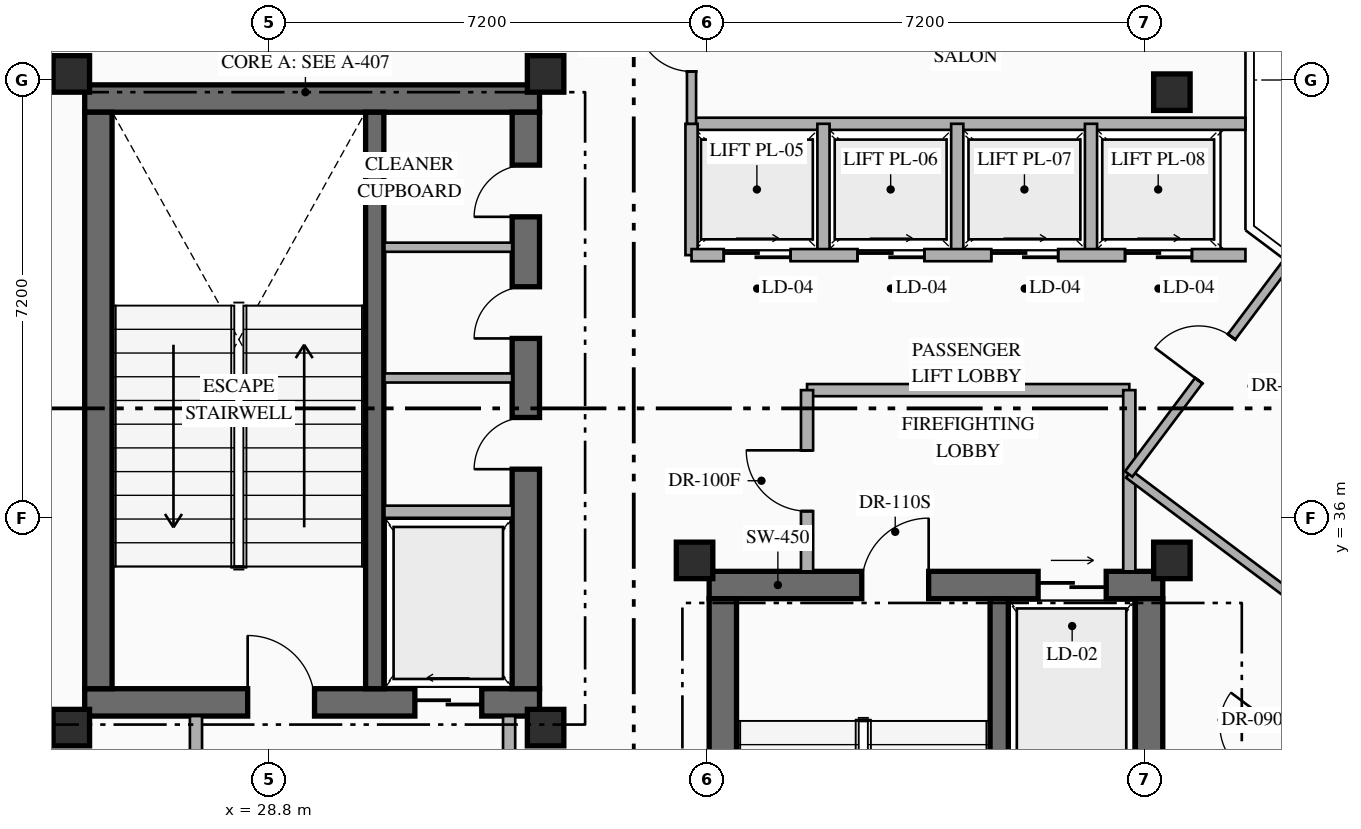
"""IFC4 building model, lengths in metres.
Left out: names, types, materials, properties, quantities, classifications, styles, units other than length and angle.
Written with IfcOpenShell. Run it as: python <this file> out.ifc"""

import sys

from ifc_helpers import new_model, si_unit, direction, frame, frame_2d, origin, origin_2d, place, context, subcontext, project, spatial, rectangle, hollow_rectangle, extrude, element, fill, save


model = new_model("IFC4")
c1 = context("Model", 3, precision=1e-05, world=origin(), true_north=direction((0.0, 1.0)))
c2 = subcontext(c1, "Body", "Model", "MODEL_VIEW")
j1 = project(units=[si_unit("LENGTHUNIT", "METRE"), si_unit("PLANEANGLEUNIT", "RADIAN")], contexts=[c1])
p1 = place(None, origin())
s1 = spatial("IfcSite", under=j1, at=p1, CompositionType="ELEMENT")
p2 = place(p1, origin())
s2 = spatial("IfcBuilding", under=s1, at=p2, CompositionType="ELEMENT")
p3 = place(p2, frame((0.0, 0.0, 273.95)))
s3 = spatial("IfcBuildingStorey", under=s2, at=p3, CompositionType="ELEMENT", Elevation=273.95)
p4 = place(p3, frame((25.77, 32.965, 0.0), z_axis=(0.0, 0.0, 1.0), x_axis=(1.0, 0.0, 0.0)))
e1 = element("IfcWall", 1, at=p4, inside=s3, PredefinedType="SHEAR", context=c2, shape_type="SweptSolid", body=[
    extrude(rectangle(XDim=7.48, YDim=0.45, at=frame_2d((3.74, 0.0))), origin(), (0.0, 0.0, 1.0), 4.0),
])
p5 = place(p4, frame((2.68, 0.0, 0.0)))
e2 = element("IfcOpeningElement", 2, at=p5, cuts=e1, PredefinedType="OPENING", context=c2, shape_type="SweptSolid", body=[
    extrude(rectangle(XDim=1.1, YDim=2.2, at=frame_2d((0.55, 1.1))), frame((0.0, 0.235, 0.0), z_axis=(0.0, -1.0, 0.0), x_axis=(1.0, 0.0, 0.0)), (0.0, 0.0, 1.0), 0.47),
])
p6 = place(p4, frame((5.43, 0.0, 0.0)))
e3 = element("IfcOpeningElement", 3, at=p6, cuts=e1, PredefinedType="OPENING", context=c2, shape_type="SweptSolid", body=[
    extrude(rectangle(XDim=1.1, YDim=2.15, at=frame_2d((0.55, 1.075))), frame((0.0, 0.235, 0.0), z_axis=(0.0, -1.0, 0.0), x_axis=(1.0, 0.0, 0.0)), (0.0, 0.0, 1.0), 0.47),
])
p7 = place(p3, frame((25.77, 42.895, 0.0), z_axis=(0.0, 0.0, 1.0), x_axis=(1.0, 0.0, 0.0)))
e4 = element("IfcWall", 4, at=p7, inside=s3, PredefinedType="SHEAR", context=c2, shape_type="SweptSolid", body=[
    extrude(rectangle(XDim=7.48, YDim=0.45, at=frame_2d((3.74, 0.0))), origin(), (0.0, 0.0, 1.0), 4.0),
])
p8 = place(p3, frame((25.995, 33.19, 0.0), z_axis=(0.0, 0.0, 1.0), x_axis=(0.0, 1.0, 0.0)))
e5 = element("IfcWall", 5, at=p8, inside=s3, PredefinedType="SHEAR", context=c2, shape_type="SweptSolid", body=[
    extrude(rectangle(XDim=9.48, YDim=0.45, at=frame_2d((4.74, 0.0))), origin(), (0.0, 0.0, 1.0), 4.0),
])
p9 = place(p3, frame((33.025, 33.19, 0.0), z_axis=(0.0, 0.0, 1.0), x_axis=(0.0, 1.0, 0.0)))
e6 = element("IfcWall", 6, at=p9, inside=s3, PredefinedType="SHEAR", context=c2, shape_type="SweptSolid", body=[
    extrude(rectangle(XDim=9.48, YDim=0.45, at=frame_2d((4.74, 0.0))), origin(), (0.0, 0.0, 1.0), 4.0),
])
p10 = place(p9, frame((3.61, 0.0, 0.0)))
e7 = element("IfcOpeningElement", 7, at=p10, cuts=e6, PredefinedType="OPENING", context=c2, shape_type="SweptSolid", body=[
    extrude(rectangle(XDim=0.85, YDim=2.08, at=frame_2d((0.425, 1.04))), frame((0.0, 0.235, 0.0), z_axis=(0.0, -1.0, 0.0), x_axis=(1.0, 0.0, 0.0)), (0.0, 0.0, 1.0), 0.47),
])
p11 = place(p9, frame((5.76, 0.0, 0.0)))
e8 = element("IfcOpeningElement", 8, at=p11, cuts=e6, PredefinedType="OPENING", context=c2, shape_type="SweptSolid", body=[
    extrude(rectangle(XDim=0.85, YDim=2.08, at=frame_2d((0.425, 1.04))), frame((0.0, 0.235, 0.0), z_axis=(0.0, -1.0, 0.0), x_axis=(1.0, 0.0, 0.0)), (0.0, 0.0, 1.0), 0.47),
])
p12 = place(p9, frame((7.76, 0.0, 0.0)))
e9 = element("IfcOpeningElement", 9, at=p12, cuts=e6, PredefinedType="OPENING", context=c2, shape_type="SweptSolid", body=[
    extrude(rectangle(XDim=0.85, YDim=2.08, at=frame_2d((0.425, 1.04))), frame((0.0, 0.235, 0.0), z_axis=(0.0, -1.0, 0.0), x_axis=(1.0, 0.0, 0.0)), (0.0, 0.0, 1.0), 0.47),
])
p13 = place(p3, frame((30.54, 33.19, 0.0), z_axis=(0.0, 0.0, 1.0), x_axis=(0.0, 1.0, 0.0)))
e10 = element("IfcWall", 10, at=p13, inside=s3, PredefinedType="SHEAR", context=c2, shape_type="SweptSolid", body=[
    extrude(rectangle(XDim=9.48, YDim=0.3, at=frame_2d((4.74, 0.0))), origin(), (0.0, 0.0, 1.0), 4.0),
])
p14 = place(p3, frame((36.04, 34.895, 0.0), z_axis=(0.0, 0.0, 1.0), x_axis=(1.0, 0.0, 0.0)))
e11 = element("IfcWall", 11, at=p14, inside=s3, PredefinedType="SHEAR", context=c2, shape_type="SweptSolid", body=[
    extrude(rectangle(XDim=7.46, YDim=0.45, at=frame_2d((3.73, 0.0))), origin(), (0.0, 0.0, 1.0), 4.0),
])
p15 = place(p14, frame((2.51, 0.0, 0.0)))
e12 = element("IfcOpeningElement", 12, at=p15, cuts=e11, PredefinedType="OPENING", context=c2, shape_type="SweptSolid", body=[
    extrude(rectangle(XDim=1.1, YDim=2.2, at=frame_2d((0.55, 1.1))), frame((0.0, 0.235, 0.0), z_axis=(0.0, -1.0, 0.0), x_axis=(1.0, 0.0, 0.0)), (0.0, 0.0, 1.0), 0.47),
])
p16 = place(p14, frame((5.41, 0.0, 0.0)))
e13 = element("IfcOpeningElement", 13, at=p16, cuts=e11, PredefinedType="OPENING", context=c2, shape_type="SweptSolid", body=[
    extrude(rectangle(XDim=1.12, YDim=2.15, at=frame_2d((0.56, 1.075))), frame((0.0, 0.235, 0.0), z_axis=(0.0, -1.0, 0.0), x_axis=(1.0, 0.0, 0.0)), (0.0, 0.0, 1.0), 0.47),
])
p17 = place(p3, frame((36.265, 25.19, 0.0), z_axis=(0.0, 0.0, 1.0), x_axis=(0.0, 1.0, 0.0)))
e14 = element("IfcWall", 14, at=p17, inside=s3, PredefinedType="SHEAR", context=c2, shape_type="SweptSolid", body=[
    extrude(rectangle(XDim=9.48, YDim=0.45, at=frame_2d((4.74, 0.0))), origin(), (0.0, 0.0, 1.0), 4.0),
])
p18 = place(p3, frame((43.275, 25.19, 0.0), z_axis=(0.0, 0.0, 1.0), x_axis=(0.0, 1.0, 0.0)))
e15 = element("IfcWall", 15, at=p18, inside=s3, PredefinedType="SHEAR", context=c2, shape_type="SweptSolid", body=[
    extrude(rectangle(XDim=9.48, YDim=0.45, at=frame_2d((4.74, 0.0))), origin(), (0.0, 0.0, 1.0), 4.0),
])
p19 = place(p18, frame((0.66, 0.0, 0.0)))
e16 = element("IfcOpeningElement", 16, at=p19, cuts=e15, PredefinedType="OPENING", context=c2, shape_type="SweptSolid", body=[
    extrude(rectangle(XDim=0.85, YDim=2.08, at=frame_2d((0.425, 1.04))), frame((0.0, 0.235, 0.0), z_axis=(0.0, -1.0, 0.0), x_axis=(1.0, 0.0, 0.0)), (0.0, 0.0, 1.0), 0.47),
])
p20 = place(p18, frame((2.86, 0.0, 0.0)))
e17 = element("IfcOpeningElement", 17, at=p20, cuts=e15, PredefinedType="OPENING", context=c2, shape_type="SweptSolid", body=[
    extrude(rectangle(XDim=0.85, YDim=2.08, at=frame_2d((0.425, 1.04))), frame((0.0, 0.235, 0.0), z_axis=(0.0, -1.0, 0.0), x_axis=(1.0, 0.0, 0.0)), (0.0, 0.0, 1.0), 0.47),
])
p21 = place(p18, frame((5.01, 0.0, 0.0)))
e18 = element("IfcOpeningElement", 18, at=p21, cuts=e15, PredefinedType="OPENING", context=c2, shape_type="SweptSolid", body=[
    extrude(rectangle(XDim=0.85, YDim=2.08, at=frame_2d((0.425, 1.04))), frame((0.0, 0.235, 0.0), z_axis=(0.0, -1.0, 0.0), x_axis=(1.0, 0.0, 0.0)), (0.0, 0.0, 1.0), 0.47),
])
p22 = place(p3, frame((40.81, 25.19, 0.0), z_axis=(0.0, 0.0, 1.0), x_axis=(0.0, 1.0, 0.0)))
e19 = element("IfcWall", 19, at=p22, inside=s3, PredefinedType="SHEAR", context=c2, shape_type="SweptSolid", body=[
    extrude(rectangle(XDim=9.48, YDim=0.3, at=frame_2d((4.74, 0.0))), origin(), (0.0, 0.0, 1.0), 4.0),
])
for number, where, z_axis, x_axis in (
    (20, (25.55, 32.55, 0.0), (0.0, 0.0, 1.0), (1.0, 0.0, 0.0)),
    (21, (33.35, 32.55, 0.0), (0.0, 0.0, 1.0), (1.0, 0.0, 0.0)),
    (22, (25.55, 43.3, 0.0), (0.0, 0.0, 1.0), (1.0, 0.0, 0.0)),
    (23, (33.35, 43.3, 0.0), (0.0, 0.0, 1.0), (1.0, 0.0, 0.0)),
    (24, (35.8, 35.3, 0.0), (0.0, 0.0, 1.0), (1.0, 0.0, 0.0)),
    (25, (43.65, 35.3, 0.0), (0.0, 0.0, 1.0), (1.0, 0.0, 0.0)),
    (26, (43.65, 43.0, 0.0), (0.0, 0.0, 1.0), (1.0, 0.0, 0.0)),
):
    element("IfcColumn", number, at=place(p3, frame(where, z_axis=z_axis, x_axis=x_axis)), inside=s3, PredefinedType="COLUMN", context=c2, shape_type="SweptSolid", body=[
        extrude(hollow_rectangle(XDim=0.6, YDim=0.6, WallThickness=0.025, at=origin_2d()), origin(), (0.0, 0.0, 1.0), 4.0),
    ])
p23 = place(p3, frame((30.7, 36.1, 0.0), z_axis=(0.0, 0.0, 1.0), x_axis=(1.0, 0.0, 0.0)))
e27 = element("IfcWall", 27, at=p23, inside=s3, PredefinedType="STANDARD", context=c2, shape_type="SweptSolid", body=[
    extrude(rectangle(XDim=2.1, YDim=0.2, at=frame_2d((1.05, 0.0))), origin(), (0.0, 0.0, 1.0), 3.75),
])
for number, where, z_axis, x_axis in (
    (28, (30.7, 38.3, 0.0), (0.0, 0.0, 1.0), (1.0, 0.0, 0.0)),
    (29, (30.7, 40.45, 0.0), (0.0, 0.0, 1.0), (1.0, 0.0, 0.0)),
):
    element("IfcWall", number, at=place(p3, frame(where, z_axis=z_axis, x_axis=x_axis)), inside=s3, PredefinedType="PARTITIONING", context=c2, shape_type="SweptSolid", body=[
        extrude(rectangle(XDim=2.1, YDim=0.15, at=frame_2d((1.05, 0.0))), origin(), (0.0, 0.0, 1.0), 3.75),
    ])
p24 = place(p3, frame((27.6, 29.2, 0.0), z_axis=(0.0, 0.0, 1.0), x_axis=(0.0, 1.0, 0.0)))
e30 = element("IfcWall", 30, at=p24, inside=s3, PredefinedType="STANDARD", context=c2, shape_type="SweptSolid", body=[
    extrude(rectangle(XDim=3.54, YDim=0.2, at=frame_2d((1.77, 0.0))), origin(), (0.0, 0.0, 1.0), 3.75),
])
p25 = place(p3, frame((32.75, 29.2, 0.0), z_axis=(0.0, 0.0, 1.0), x_axis=(0.0, 1.0, 0.0)))
e31 = element("IfcWall", 31, at=p25, inside=s3, PredefinedType="STANDARD", context=c2, shape_type="SweptSolid", body=[
    extrude(rectangle(XDim=3.54, YDim=0.2, at=frame_2d((1.77, 0.0))), origin(), (0.0, 0.0, 1.0), 3.75),
])
p26 = place(p25, frame((1.45, 0.0, 0.0)))
e32 = element("IfcOpeningElement", 32, at=p26, cuts=e31, PredefinedType="OPENING", context=c2, shape_type="SweptSolid", body=[
    extrude(rectangle(XDim=1.0, YDim=2.2, at=frame_2d((0.5, 1.1))), frame((0.0, 0.11, 0.0), z_axis=(0.0, -1.0, 0.0), x_axis=(1.0, 0.0, 0.0)), (0.0, 0.0, 1.0), 0.22),
])
p27 = place(p3, frame((37.65, 38.1, 0.0), z_axis=(0.0, 0.0, 1.0), x_axis=(1.0, 0.0, 0.0)))
e33 = element("IfcWall", 33, at=p27, inside=s3, PredefinedType="STANDARD", context=c2, shape_type="SweptSolid", body=[
    extrude(rectangle(XDim=5.3, YDim=0.2, at=frame_2d((2.65, 0.0))), origin(), (0.0, 0.0, 1.0), 3.75),
])
p28 = place(p3, frame((42.95, 35.12, 0.0), z_axis=(0.0, 0.0, 1.0), x_axis=(0.0, 1.0, 0.0)))
e34 = element("IfcWall", 34, at=p28, inside=s3, PredefinedType="STANDARD", context=c2, shape_type="SweptSolid", body=[
    extrude(rectangle(XDim=2.98, YDim=0.2, at=frame_2d((1.49, 0.0))), origin(), (0.0, 0.0, 1.0), 3.75),
])
p29 = place(p3, frame((37.65, 35.12, 0.0), z_axis=(0.0, 0.0, 1.0), x_axis=(0.0, 1.0, 0.0)))
e35 = element("IfcWall", 35, at=p29, inside=s3, PredefinedType="STANDARD", context=c2, shape_type="SweptSolid", body=[
    extrude(rectangle(XDim=2.98, YDim=0.2, at=frame_2d((1.49, 0.0))), origin(), (0.0, 0.0, 1.0), 3.75),
])
p30 = place(p29, frame((0.99, 0.0, 0.0)))
e36 = element("IfcOpeningElement", 36, at=p30, cuts=e35, PredefinedType="OPENING", context=c2, shape_type="SweptSolid", body=[
    extrude(rectangle(XDim=1.0, YDim=2.2, at=frame_2d((0.5, 1.1))), frame((0.0, 0.11, 0.0), z_axis=(0.0, -1.0, 0.0), x_axis=(1.0, 0.0, 0.0)), (0.0, 0.0, 1.0), 0.22),
])
p31 = place(p3, frame((35.75, 42.48, 0.0), z_axis=(0.0, 0.0, 1.0), x_axis=(1.0, 0.0, 0.0)))
e37 = element("IfcWall", 37, at=p31, inside=s3, PredefinedType="STANDARD", context=c2, shape_type="SweptSolid", body=[
    extrude(rectangle(XDim=9.11, YDim=0.2, at=frame_2d((4.555, 0.0))), origin(), (0.0, 0.0, 1.0), 3.75),
])
for number, where, z_axis, x_axis in (
    (38, (35.75, 40.32, 0.0), (0.0, 0.0, 1.0), (0.0, 1.0, 0.0)),
    (39, (37.92, 40.32, 0.0), (0.0, 0.0, 1.0), (0.0, 1.0, 0.0)),
    (40, (40.12, 40.32, 0.0), (0.0, 0.0, 1.0), (0.0, 1.0, 0.0)),
    (41, (42.32, 40.32, 0.0), (0.0, 0.0, 1.0), (0.0, 1.0, 0.0)),
):
    element("IfcWall", number, at=place(p3, frame(where, z_axis=z_axis, x_axis=x_axis)), inside=s3, PredefinedType="STANDARD", context=c2, shape_type="SweptSolid", body=[
        extrude(rectangle(XDim=2.16, YDim=0.2, at=frame_2d((1.08, 0.0))), origin(), (0.0, 0.0, 1.0), 3.75),
    ])
p32 = place(p3, frame((35.75, 40.32, 0.0), z_axis=(0.0, 0.0, 1.0), x_axis=(1.0, 0.0, 0.0)))
e42 = element("IfcWall", 42, at=p32, inside=s3, PredefinedType="STANDARD", context=c2, shape_type="SweptSolid", body=[
    extrude(rectangle(XDim=9.11, YDim=0.2, at=frame_2d((4.555, 0.0))), origin(), (0.0, 0.0, 1.0), 3.75),
])
p33 = place(p32, frame((0.53, 0.0, 0.0)))
e43 = element("IfcOpeningElement", 43, at=p33, cuts=e42, PredefinedType="OPENING", context=c2, shape_type="SweptSolid", body=[
    extrude(rectangle(XDim=1.1, YDim=2.18, at=frame_2d((0.55, 1.09))), frame((0.0, 0.11, 0.0), z_axis=(0.0, -1.0, 0.0), x_axis=(1.0, 0.0, 0.0)), (0.0, 0.0, 1.0), 0.22),
])
p34 = place(p32, frame((2.73, 0.0, 0.0)))
e44 = element("IfcOpeningElement", 44, at=p34, cuts=e42, PredefinedType="OPENING", context=c2, shape_type="SweptSolid", body=[
    extrude(rectangle(XDim=1.1, YDim=2.18, at=frame_2d((0.55, 1.09))), frame((0.0, 0.11, 0.0), z_axis=(0.0, -1.0, 0.0), x_axis=(1.0, 0.0, 0.0)), (0.0, 0.0, 1.0), 0.22),
])
p35 = place(p32, frame((4.93, 0.0, 0.0)))
e45 = element("IfcOpeningElement", 45, at=p35, cuts=e42, PredefinedType="OPENING", context=c2, shape_type="SweptSolid", body=[
    extrude(rectangle(XDim=1.1, YDim=2.18, at=frame_2d((0.55, 1.09))), frame((0.0, 0.11, 0.0), z_axis=(0.0, -1.0, 0.0), x_axis=(1.0, 0.0, 0.0)), (0.0, 0.0, 1.0), 0.22),
])
p36 = place(p32, frame((7.13, 0.0, 0.0)))
e46 = element("IfcOpeningElement", 46, at=p36, cuts=e42, PredefinedType="OPENING", context=c2, shape_type="SweptSolid", body=[
    extrude(rectangle(XDim=1.1, YDim=2.18, at=frame_2d((0.55, 1.09))), frame((0.0, 0.11, 0.0), z_axis=(0.0, -1.0, 0.0), x_axis=(1.0, 0.0, 0.0)), (0.0, 0.0, 1.0), 0.22),
])
p37 = place(p3, frame((35.75, 42.48, 0.0), z_axis=(0.0, 0.0, 1.0), x_axis=(0.0, 1.0, 0.0)))
e47 = element("IfcWall", 47, at=p37, inside=s3, PredefinedType="PARTITIONING", context=c2, shape_type="SweptSolid", body=[
    extrude(rectangle(XDim=2.62, YDim=0.15, at=frame_2d((1.31, 0.0))), origin(), (0.0, 0.0, 1.0), 3.75),
])
p38 = place(p37, frame((0.86, 0.0, 0.0)))
e48 = element("IfcOpeningElement", 48, at=p38, cuts=e47, PredefinedType="OPENING", context=c2, shape_type="SweptSolid", body=[
    extrude(rectangle(XDim=0.9, YDim=2.15, at=frame_2d((0.45, 1.075))), frame((0.0, 0.085, 0.0), z_axis=(0.0, -1.0, 0.0), x_axis=(1.0, 0.0, 0.0)), (0.0, 0.0, 1.0), 0.17),
])
p39 = place(p3, frame((43.48, 30.107, 0.0), z_axis=(0.0, 0.0, 1.0), x_axis=(0.600015730265, 0.799988202059, 0.0)))
e49 = element("IfcWall", 49, at=p39, inside=s3, PredefinedType="PARTITIONING", context=c2, shape_type="SweptSolid", body=[
    extrude(rectangle(XDim=4.967, YDim=0.15, at=frame_2d((2.483, 0.0))), origin(), (0.0, 0.0, 1.0), 3.75),
])
p40 = place(p39, frame((2.199, 0.0, 0.0)))
e50 = element("IfcOpeningElement", 50, at=p40, cuts=e49, PredefinedType="OPENING", context=c2, shape_type="SweptSolid", body=[
    extrude(rectangle(XDim=0.9, YDim=2.15, at=frame_2d((0.45, 1.075))), frame((0.0, 0.085, 0.0), z_axis=(0.0, -1.0, 0.0), x_axis=(1.0, 0.0, 0.0)), (0.0, 0.0, 1.0), 0.17),
])
p41 = place(p3, frame((42.94, 36.72, 0.0), z_axis=(0.0, 0.0, 1.0), x_axis=(0.800013316712, -0.599982243973, 0.0)))
e51 = element("IfcWall", 51, at=p41, inside=s3, PredefinedType="PARTITIONING", context=c2, shape_type="SweptSolid", body=[
    extrude(rectangle(XDim=4.4, YDim=0.15, at=frame_2d((2.2, 0.0))), origin(), (0.0, 0.0, 1.0), 3.295),
])
p42 = place(p3, frame((42.94, 36.72, 0.0), z_axis=(0.0, 0.0, 1.0), x_axis=(0.599991241767, 0.8000065686, 0.0)))
e52 = element("IfcWall", 52, at=p42, inside=s3, PredefinedType="PARTITIONING", context=c2, shape_type="SweptSolid", body=[
    extrude(rectangle(XDim=4.46, YDim=0.15, at=frame_2d((2.23, 0.0))), origin(), (0.0, 0.0, 1.0), 3.75),
])
p43 = place(p42, frame((1.92, 0.0, 0.0)))
e53 = element("IfcOpeningElement", 53, at=p43, cuts=e52, PredefinedType="OPENING", context=c2, shape_type="SweptSolid", body=[
    extrude(rectangle(XDim=0.9, YDim=2.15, at=frame_2d((0.45, 1.075))), frame((0.0, 0.085, 0.0), z_axis=(0.0, -1.0, 0.0), x_axis=(1.0, 0.0, 0.0)), (0.0, 0.0, 1.0), 0.17),
])
p44 = place(p5, origin())
e54 = element("IfcDoor", 54, at=p44, inside=s3, OperationType="SINGLE_SWING_LEFT", PredefinedType="DOOR", context=c2, shape_type="SweptSolid", body=[
    extrude(rectangle(XDim=1.1, YDim=2.2, at=frame_2d((0.55, 1.1))), frame((0.0, 0.025, 0.0), z_axis=(0.0, -1.0, 0.0), x_axis=(1.0, 0.0, 0.0)), (0.0, 0.0, 1.0), 0.05),
])
fill(e2, e54)
p45 = place(p6, origin())
e55 = element("IfcDoor", 55, at=p45, inside=s3, OperationType="SLIDING_TO_LEFT", PredefinedType="USERDEFINED", context=c2, shape_type="SweptSolid", body=[
    extrude(rectangle(XDim=1.1, YDim=2.15, at=frame_2d((0.55, 1.075))), frame((0.0, 0.025, 0.0), z_axis=(0.0, -1.0, 0.0), x_axis=(1.0, 0.0, 0.0)), (0.0, 0.0, 1.0), 0.05),
])
fill(e3, e55)
p46 = place(p15, origin())
e56 = element("IfcDoor", 56, at=p46, inside=s3, OperationType="SINGLE_SWING_RIGHT", PredefinedType="DOOR", context=c2, shape_type="SweptSolid", body=[
    extrude(rectangle(XDim=1.1, YDim=2.2, at=frame_2d((0.55, 1.1))), frame((0.0, 0.025, 0.0), z_axis=(0.0, -1.0, 0.0), x_axis=(1.0, 0.0, 0.0)), (0.0, 0.0, 1.0), 0.05),
])
fill(e12, e56)
p47 = place(p16, origin())
e57 = element("IfcDoor", 57, at=p47, inside=s3, OperationType="SLIDING_TO_RIGHT", PredefinedType="USERDEFINED", context=c2, shape_type="SweptSolid", body=[
    extrude(rectangle(XDim=1.12, YDim=2.15, at=frame_2d((0.56, 1.075))), frame((0.0, 0.025, 0.0), z_axis=(0.0, -1.0, 0.0), x_axis=(1.0, 0.0, 0.0)), (0.0, 0.0, 1.0), 0.05),
])
fill(e13, e57)
p48 = place(p10, origin())
e58 = element("IfcDoor", 58, at=p48, inside=s3, OperationType="SINGLE_SWING_LEFT", PredefinedType="DOOR", context=c2, shape_type="SweptSolid", body=[
    extrude(rectangle(XDim=0.85, YDim=2.08, at=frame_2d((0.425, 1.04))), frame((0.0, 0.025, 0.0), z_axis=(0.0, -1.0, 0.0), x_axis=(1.0, 0.0, 0.0)), (0.0, 0.0, 1.0), 0.05),
])
fill(e7, e58)
p49 = place(p11, origin())
e59 = element("IfcDoor", 59, at=p49, inside=s3, OperationType="SINGLE_SWING_LEFT", PredefinedType="DOOR", context=c2, shape_type="SweptSolid", body=[
    extrude(rectangle(XDim=0.85, YDim=2.08, at=frame_2d((0.425, 1.04))), frame((0.0, 0.025, 0.0), z_axis=(0.0, -1.0, 0.0), x_axis=(1.0, 0.0, 0.0)), (0.0, 0.0, 1.0), 0.05),
])
fill(e8, e59)
p50 = place(p12, origin())
e60 = element("IfcDoor", 60, at=p50, inside=s3, OperationType="SINGLE_SWING_LEFT", PredefinedType="DOOR", context=c2, shape_type="SweptSolid", body=[
    extrude(rectangle(XDim=0.85, YDim=2.08, at=frame_2d((0.425, 1.04))), frame((0.0, 0.025, 0.0), z_axis=(0.0, -1.0, 0.0), x_axis=(1.0, 0.0, 0.0)), (0.0, 0.0, 1.0), 0.05),
])
fill(e9, e60)
p51 = place(p30, origin())
e61 = element("IfcDoor", 61, at=p51, inside=s3, OperationType="SINGLE_SWING_RIGHT", PredefinedType="DOOR", context=c2, shape_type="SweptSolid", body=[
    extrude(rectangle(XDim=1.0, YDim=2.2, at=frame_2d((0.5, 1.1))), frame((0.0, 0.025, 0.0), z_axis=(0.0, -1.0, 0.0), x_axis=(1.0, 0.0, 0.0)), (0.0, 0.0, 1.0), 0.05),
])
fill(e36, e61)
p52 = place(p33, origin())
e62 = element("IfcDoor", 62, at=p52, inside=s3, OperationType="SLIDING_TO_RIGHT", PredefinedType="USERDEFINED", context=c2, shape_type="SweptSolid", body=[
    extrude(rectangle(XDim=1.1, YDim=2.18, at=frame_2d((0.55, 1.09))), frame((0.0, 0.025, 0.0), z_axis=(0.0, -1.0, 0.0), x_axis=(1.0, 0.0, 0.0)), (0.0, 0.0, 1.0), 0.05),
])
fill(e43, e62)
p53 = place(p34, origin())
e63 = element("IfcDoor", 63, at=p53, inside=s3, OperationType="SLIDING_TO_RIGHT", PredefinedType="USERDEFINED", context=c2, shape_type="SweptSolid", body=[
    extrude(rectangle(XDim=1.1, YDim=2.18, at=frame_2d((0.55, 1.09))), frame((0.0, 0.025, 0.0), z_axis=(0.0, -1.0, 0.0), x_axis=(1.0, 0.0, 0.0)), (0.0, 0.0, 1.0), 0.05),
])
fill(e44, e63)
p54 = place(p35, origin())
e64 = element("IfcDoor", 64, at=p54, inside=s3, OperationType="SLIDING_TO_RIGHT", PredefinedType="USERDEFINED", context=c2, shape_type="SweptSolid", body=[
    extrude(rectangle(XDim=1.1, YDim=2.18, at=frame_2d((0.55, 1.09))), frame((0.0, 0.025, 0.0), z_axis=(0.0, -1.0, 0.0), x_axis=(1.0, 0.0, 0.0)), (0.0, 0.0, 1.0), 0.05),
])
fill(e45, e64)
p55 = place(p36, origin())
e65 = element("IfcDoor", 65, at=p55, inside=s3, OperationType="SLIDING_TO_RIGHT", PredefinedType="USERDEFINED", context=c2, shape_type="SweptSolid", body=[
    extrude(rectangle(XDim=1.1, YDim=2.18, at=frame_2d((0.55, 1.09))), frame((0.0, 0.025, 0.0), z_axis=(0.0, -1.0, 0.0), x_axis=(1.0, 0.0, 0.0)), (0.0, 0.0, 1.0), 0.05),
])
fill(e46, e65)
p56 = place(p38, origin())
e66 = element("IfcDoor", 66, at=p56, inside=s3, OperationType="SINGLE_SWING_RIGHT", PredefinedType="DOOR", context=c2, shape_type="SweptSolid", body=[
    extrude(rectangle(XDim=0.9, YDim=2.15, at=frame_2d((0.45, 1.075))), frame((0.0, 0.025, 0.0), z_axis=(0.0, -1.0, 0.0), x_axis=(1.0, 0.0, 0.0)), (0.0, 0.0, 1.0), 0.05),
])
fill(e48, e66)
p57 = place(p40, origin())
e67 = element("IfcDoor", 67, at=p57, inside=s3, OperationType="SINGLE_SWING_RIGHT", PredefinedType="DOOR", context=c2, shape_type="SweptSolid", body=[
    extrude(rectangle(XDim=0.9, YDim=2.15, at=frame_2d((0.45, 1.075))), frame((0.0, 0.025, 0.0), z_axis=(0.0, -1.0, 0.0), x_axis=(1.0, 0.0, 0.0)), (0.0, 0.0, 1.0), 0.05),
])
fill(e50, e67)
p58 = place(p43, origin())
e68 = element("IfcDoor", 68, at=p58, inside=s3, OperationType="SINGLE_SWING_LEFT", PredefinedType="DOOR", context=c2, shape_type="SweptSolid", body=[
    extrude(rectangle(XDim=0.9, YDim=2.15, at=frame_2d((0.45, 1.075))), frame((0.0, 0.025, 0.0), z_axis=(0.0, -1.0, 0.0), x_axis=(1.0, 0.0, 0.0)), (0.0, 0.0, 1.0), 0.05),
])
fill(e53, e68)
save(model, sys.argv[1])
